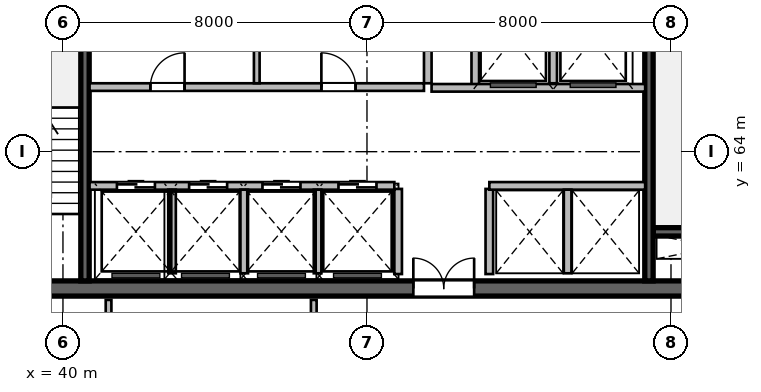
"""IFC4 building model, lengths in metres.
Left out: names, types, materials, properties, quantities, classifications, styles, units other than length and angle.
Written with IfcOpenShell. Run it as: python <this file> out.ifc"""

import sys

from ifc_helpers import new_model, si_unit, direction, frame, frame_2d, origin, place, context, subcontext, project, spatial, rectangle, extrude, source, transform, mapped, element, fill, save


model = new_model("IFC4")
c1 = context("Model", 3, precision=1e-05, world=origin(), true_north=direction((0.0, 1.0)))
c2 = subcontext(c1, "Body", "Model", "MODEL_VIEW")
j1 = project(units=[si_unit("LENGTHUNIT", "METRE"), si_unit("PLANEANGLEUNIT", "RADIAN")], contexts=[c1])
p1 = place(None, origin())
s1 = spatial("IfcSite", under=j1, at=p1, CompositionType="ELEMENT")
p2 = place(p1, origin())
s2 = spatial("IfcBuilding", under=s1, at=p2, CompositionType="ELEMENT")
p3 = place(p2, frame((0.0, 0.0, 283.5)))
s3 = spatial("IfcBuildingStorey", under=s2, at=p3, CompositionType="ELEMENT", Elevation=283.5)
m1 = source(origin(), c2, "Body", "SweptSolid", [
    extrude(rectangle(XDim=21.6, YDim=0.4, at=frame_2d((10.8, 0.0))), origin(), (0.0, 0.0, 1.0), 3.9),
])
p4 = place(p3, frame((37.2, 60.4, 0.0), z_axis=(0.0, 0.0, 1.0), x_axis=(1.0, 0.0, 0.0)))
e1 = element("IfcWall", 1, at=p4, inside=s3, PredefinedType="SHEAR", context=c2, shape_type="MappedRepresentation", body=[
    mapped(m1, transform((0.0, 0.0, 0.0), scale=1.0)),
])
p5 = place(p4, frame((1.1, 0.0, 0.0)))
e2 = element("IfcOpeningElement", 2, at=p5, cuts=e1, PredefinedType="OPENING", context=c2, shape_type="SweptSolid", body=[
    extrude(rectangle(XDim=1.15, YDim=2.15, at=frame_2d((0.575, 1.075))), frame((0.0, 0.21, 0.0), z_axis=(0.0, -1.0, 0.0), x_axis=(1.0, 0.0, 0.0)), (0.0, 0.0, 1.0), 0.42),
])
p6 = place(p4, frame((19.5, 0.0, 0.0)))
e3 = element("IfcOpeningElement", 3, at=p6, cuts=e1, PredefinedType="OPENING", context=c2, shape_type="SweptSolid", body=[
    extrude(rectangle(XDim=0.9, YDim=2.1, at=frame_2d((0.45, 1.05))), frame((0.0, 0.21, 0.0), z_axis=(0.0, -1.0, 0.0), x_axis=(1.0, 0.0, 0.0)), (0.0, 0.0, 1.0), 0.42),
])
p7 = place(p4, frame((12.02, 0.0, 0.0)))
e4 = element("IfcOpeningElement", 4, at=p7, cuts=e1, PredefinedType="OPENING", context=c2, shape_type="SweptSolid", body=[
    extrude(rectangle(XDim=1.6, YDim=2.15, at=frame_2d((0.8, 1.075))), frame((0.0, 0.21, 0.0), z_axis=(0.0, -1.0, 0.0), x_axis=(1.0, 0.0, 0.0)), (0.0, 0.0, 1.0), 0.42),
])
m2 = source(origin(), c2, "Body", "SweptSolid", [
    extrude(rectangle(XDim=3.27, YDim=0.22, at=frame_2d((1.635, 0.0))), origin(), (0.0, 0.0, 1.0), 3.9),
])
p8 = place(p3, frame((55.53, 61.89, 0.0), z_axis=(0.0, 0.0, 1.0), x_axis=(1.0, 0.0, 0.0)))
e5 = element("IfcWall", 5, at=p8, inside=s3, PredefinedType="SHEAR", context=c2, shape_type="MappedRepresentation", body=[
    mapped(m2, transform((0.0, 0.0, 0.0), scale=1.0)),
])
m3 = source(origin(), c2, "Body", "SweptSolid", [
    extrude(rectangle(XDim=11.2, YDim=0.22, at=frame_2d((5.6, 0.0))), origin(), (0.0, 0.0, 1.0), 3.9),
])
p9 = place(p3, frame((40.58, 60.6, 0.0), z_axis=(0.0, 0.0, 1.0), x_axis=(0.0, 1.0, 0.0)))
e6 = element("IfcWall", 6, at=p9, inside=s3, PredefinedType="SHEAR", context=c2, shape_type="MappedRepresentation", body=[
    mapped(m3, transform((0.0, 0.0, 0.0), scale=1.0)),
])
p10 = place(p3, frame((55.42, 60.6, 0.0), z_axis=(0.0, 0.0, 1.0), x_axis=(0.0, 1.0, 0.0)))
e7 = element("IfcWall", 7, at=p10, inside=s3, PredefinedType="SHEAR", context=c2, shape_type="MappedRepresentation", body=[
    mapped(m3, transform((0.0, 0.0, 0.0), scale=1.0)),
])
p11 = place(p10, frame((9.645, 0.0, 0.0)))
e8 = element("IfcOpeningElement", 8, at=p11, cuts=e7, PredefinedType="OPENING", context=c2, shape_type="SweptSolid", body=[
    extrude(rectangle(XDim=1.15, YDim=2.15, at=frame_2d((0.575, 1.075))), frame((0.0, 0.12, 0.0), z_axis=(0.0, -1.0, 0.0), x_axis=(1.0, 0.0, 0.0)), (0.0, 0.0, 1.0), 0.24),
])
m4 = source(origin(), c2, "Body", "SweptSolid", [
    extrude(rectangle(XDim=2.24, YDim=0.2, at=frame_2d((1.12, 0.0))), origin(), (0.0, 0.0, 1.0), 3.64),
])
for number, where, z_axis, x_axis in (
    (9, (48.82, 60.78, 0.0), (0.0, 0.0, 1.0), (0.0, 1.0, 0.0)),
    (10, (51.22, 60.78, 0.0), (0.0, 0.0, 1.0), (0.0, 1.0, 0.0)),
):
    element("IfcWall", number, at=place(p3, frame(where, z_axis=z_axis, x_axis=x_axis)), inside=s3, PredefinedType="SOLIDWALL", context=c2, shape_type="MappedRepresentation", body=[
        mapped(m4, transform((0.0, 0.0, 0.0), scale=1.0)),
    ])
m5 = source(origin(), c2, "Body", "SweptSolid", [
    extrude(rectangle(XDim=5.8, YDim=0.2, at=frame_2d((2.9, 0.0))), origin(), (0.0, 0.0, 1.0), 3.64),
])
p12 = place(p3, frame((49.6, 65.8, 0.0), z_axis=(0.0, 0.0, 1.0), x_axis=(0.0, 1.0, 0.0)))
e11 = element("IfcWall", 11, at=p12, inside=s3, PredefinedType="SOLIDWALL", context=c2, shape_type="MappedRepresentation", body=[
    mapped(m5, transform((0.0, 0.0, 0.0), scale=1.0)),
])
m6 = source(origin(), c2, "Body", "SweptSolid", [
    extrude(rectangle(XDim=2.58, YDim=0.2, at=frame_2d((1.29, 0.0))), origin(), (0.0, 0.0, 1.0), 3.64),
])
p13 = place(p3, frame((50.85, 65.68, 0.0), z_axis=(0.0, 0.0, 1.0), x_axis=(0.0, 1.0, 0.0)))
e12 = element("IfcWall", 12, at=p13, inside=s3, PredefinedType="SOLIDWALL", context=c2, shape_type="MappedRepresentation", body=[
    mapped(m6, transform((0.0, 0.0, 0.0), scale=1.0)),
])
m7 = source(origin(), c2, "Body", "SweptSolid", [
    extrude(rectangle(XDim=2.4, YDim=0.2, at=frame_2d((1.2, 0.0))), origin(), (0.0, 0.0, 1.0), 3.64),
])
p14 = place(p3, frame((52.9, 65.8, 0.0), z_axis=(0.0, 0.0, 1.0), x_axis=(0.0, 1.0, 0.0)))
e13 = element("IfcWall", 13, at=p14, inside=s3, PredefinedType="SOLIDWALL", context=c2, shape_type="MappedRepresentation", body=[
    mapped(m7, transform((0.0, 0.0, 0.0), scale=1.0)),
])
m8 = source(origin(), c2, "Body", "SweptSolid", [
    extrude(rectangle(XDim=5.62, YDim=0.2, at=frame_2d((2.81, 0.0))), origin(), (0.0, 0.0, 1.0), 3.64),
])
p15 = place(p3, frame((49.7, 65.68, 0.0), z_axis=(0.0, 0.0, 1.0), x_axis=(1.0, 0.0, 0.0)))
e14 = element("IfcWall", 14, at=p15, inside=s3, PredefinedType="SOLIDWALL", context=c2, shape_type="MappedRepresentation", body=[
    mapped(m8, transform((0.0, 0.0, 0.0), scale=1.0)),
])
m9 = source(origin(), c2, "Body", "SweptSolid", [
    extrude(rectangle(XDim=8.02, YDim=0.2, at=frame_2d((4.01, 0.0))), origin(), (0.0, 0.0, 1.0), 3.64),
])
p16 = place(p3, frame((40.7, 63.1, 0.0), z_axis=(0.0, 0.0, 1.0), x_axis=(1.0, 0.0, 0.0)))
e15 = element("IfcWall", 15, at=p16, inside=s3, PredefinedType="SOLIDWALL", context=c2, shape_type="MappedRepresentation", body=[
    mapped(m9, transform((0.0, 0.0, 0.0), scale=1.0)),
])
p17 = place(p16, frame((0.72, 0.0, 0.0)))
e16 = element("IfcOpeningElement", 16, at=p17, cuts=e15, PredefinedType="OPENING", context=c2, shape_type="SweptSolid", body=[
    extrude(rectangle(XDim=1.0, YDim=2.15, at=frame_2d((0.5, 1.075))), frame((0.0, 0.11, 0.0), z_axis=(0.0, -1.0, 0.0), x_axis=(1.0, 0.0, 0.0)), (0.0, 0.0, 1.0), 0.22),
])
p18 = place(p16, frame((2.62, 0.0, 0.0)))
e17 = element("IfcOpeningElement", 17, at=p18, cuts=e15, PredefinedType="OPENING", context=c2, shape_type="SweptSolid", body=[
    extrude(rectangle(XDim=1.0, YDim=2.15, at=frame_2d((0.5, 1.075))), frame((0.0, 0.11, 0.0), z_axis=(0.0, -1.0, 0.0), x_axis=(1.0, 0.0, 0.0)), (0.0, 0.0, 1.0), 0.22),
])
p19 = place(p16, frame((4.55, 0.0, 0.0)))
e18 = element("IfcOpeningElement", 18, at=p19, cuts=e15, PredefinedType="OPENING", context=c2, shape_type="SweptSolid", body=[
    extrude(rectangle(XDim=1.0, YDim=2.15, at=frame_2d((0.5, 1.075))), frame((0.0, 0.11, 0.0), z_axis=(0.0, -1.0, 0.0), x_axis=(1.0, 0.0, 0.0)), (0.0, 0.0, 1.0), 0.22),
])
p20 = place(p16, frame((6.55, 0.0, 0.0)))
e19 = element("IfcOpeningElement", 19, at=p20, cuts=e15, PredefinedType="OPENING", context=c2, shape_type="SweptSolid", body=[
    extrude(rectangle(XDim=1.0, YDim=2.15, at=frame_2d((0.5, 1.075))), frame((0.0, 0.11, 0.0), z_axis=(0.0, -1.0, 0.0), x_axis=(1.0, 0.0, 0.0)), (0.0, 0.0, 1.0), 0.22),
])
m10 = source(origin(), c2, "Body", "SweptSolid", [
    extrude(rectangle(XDim=4.1, YDim=0.2, at=frame_2d((2.05, 0.0))), origin(), (0.0, 0.0, 1.0), 3.64),
])
p21 = place(p3, frame((51.22, 63.1, 0.0), z_axis=(0.0, 0.0, 1.0), x_axis=(1.0, 0.0, 0.0)))
e20 = element("IfcWall", 20, at=p21, inside=s3, PredefinedType="SOLIDWALL", context=c2, shape_type="MappedRepresentation", body=[
    mapped(m10, transform((0.0, 0.0, 0.0), scale=1.0)),
])
m11 = source(origin(), c2, "Body", "SweptSolid", [
    extrude(rectangle(XDim=2.2, YDim=0.2, at=frame_2d((1.1, 0.0))), origin(), (0.0, 0.0, 1.0), 3.64),
])
for number, where, z_axis, x_axis in (
    (21, (42.87, 60.8, 0.0), (0.0, 0.0, 1.0), (0.0, 1.0, 0.0)),
    (22, (44.77, 60.8, 0.0), (0.0, 0.0, 1.0), (0.0, 1.0, 0.0)),
    (23, (46.7, 60.8, 0.0), (0.0, 0.0, 1.0), (0.0, 1.0, 0.0)),
    (24, (53.28, 60.8, 0.0), (0.0, 0.0, 1.0), (0.0, 1.0, 0.0)),
):
    element("IfcWall", number, at=place(p3, frame(where, z_axis=z_axis, x_axis=x_axis)), inside=s3, PredefinedType="SOLIDWALL", context=c2, shape_type="MappedRepresentation", body=[
        mapped(m11, transform((0.0, 0.0, 0.0), scale=1.0)),
    ])
m12 = source(origin(), c2, "Body", "SweptSolid", [
    extrude(rectangle(XDim=8.8, YDim=0.2, at=frame_2d((4.4, 0.0))), origin(), (0.0, 0.0, 1.0), 3.64),
])
p22 = place(p3, frame((40.7, 65.7, 0.0), z_axis=(0.0, 0.0, 1.0), x_axis=(1.0, 0.0, 0.0)))
e25 = element("IfcWall", 25, at=p22, inside=s3, PredefinedType="SOLIDWALL", context=c2, shape_type="MappedRepresentation", body=[
    mapped(m12, transform((0.0, 0.0, 0.0), scale=1.0)),
])
p23 = place(p22, frame((1.6, 0.0, 0.0)))
e26 = element("IfcOpeningElement", 26, at=p23, cuts=e25, PredefinedType="OPENING", context=c2, shape_type="SweptSolid", body=[
    extrude(rectangle(XDim=0.9, YDim=2.1, at=frame_2d((0.45, 1.05))), frame((0.0, 0.11, 0.0), z_axis=(0.0, -1.0, 0.0), x_axis=(1.0, 0.0, 0.0)), (0.0, 0.0, 1.0), 0.22),
])
p24 = place(p22, frame((6.1, 0.0, 0.0)))
e27 = element("IfcOpeningElement", 27, at=p24, cuts=e25, PredefinedType="OPENING", context=c2, shape_type="SweptSolid", body=[
    extrude(rectangle(XDim=0.9, YDim=2.1, at=frame_2d((0.45, 1.05))), frame((0.0, 0.11, 0.0), z_axis=(0.0, -1.0, 0.0), x_axis=(1.0, 0.0, 0.0)), (0.0, 0.0, 1.0), 0.22),
])
m13 = source(origin(), c2, "Body", "SweptSolid", [
    extrude(rectangle(XDim=2.4, YDim=0.15, at=frame_2d((1.2, 0.0))), origin(), (0.0, 0.0, 1.0), 3.64),
])
p25 = place(p3, frame((45.1, 65.8, 0.0), z_axis=(0.0, 0.0, 1.0), x_axis=(0.0, 1.0, 0.0)))
e28 = element("IfcWall", 28, at=p25, inside=s3, PredefinedType="PARTITIONING", context=c2, shape_type="MappedRepresentation", body=[
    mapped(m13, transform((0.0, 0.0, 0.0), scale=1.0)),
])
m14 = source(origin(), c2, "Body", "SweptSolid", [
    extrude(rectangle(XDim=2.033, YDim=0.15, at=frame_2d((1.016, 0.0))), origin(), (0.0, 0.0, 1.0), 3.64),
])
p26 = place(p3, frame((41.2, 58.067, 0.0), z_axis=(0.0, 0.0, 1.0), x_axis=(0.0, 1.0, 0.0)))
e29 = element("IfcWall", 29, at=p26, inside=s3, PredefinedType="PARTITIONING", context=c2, shape_type="MappedRepresentation", body=[
    mapped(m14, transform((0.0, 0.0, 0.0), scale=1.0)),
])
p27 = place(p26, frame((0.591, 0.0, 0.0)))
e30 = element("IfcOpeningElement", 30, at=p27, cuts=e29, PredefinedType="OPENING", context=c2, shape_type="SweptSolid", body=[
    extrude(rectangle(XDim=0.85, YDim=2.1, at=frame_2d((0.425, 1.05))), frame((0.0, 0.085, 0.0), z_axis=(0.0, -1.0, 0.0), x_axis=(1.0, 0.0, 0.0)), (0.0, 0.0, 1.0), 0.17),
])
p28 = place(p3, frame((46.6, 58.067, 0.0), z_axis=(0.0, 0.0, 1.0), x_axis=(0.0, 1.0, 0.0)))
e31 = element("IfcWall", 31, at=p28, inside=s3, PredefinedType="PARTITIONING", context=c2, shape_type="MappedRepresentation", body=[
    mapped(m14, transform((0.0, 0.0, 0.0), scale=1.0)),
])
m15 = source(origin(), c2, "Body", "SweptSolid", [
    extrude(rectangle(XDim=1.6, YDim=2.15, at=frame_2d((0.8, 1.075))), frame((0.0, 0.025, 0.0), z_axis=(0.0, -1.0, 0.0), x_axis=(1.0, 0.0, 0.0)), (0.0, 0.0, 1.0), 0.05),
])
p29 = place(p7, origin())
e32 = element("IfcDoor", 32, at=p29, inside=s3, OperationType="DOUBLE_DOOR_SINGLE_SWING", PredefinedType="DOOR", context=c2, shape_type="MappedRepresentation", body=[
    mapped(m15, transform((0.0, 0.0, 0.0), scale=1.0)),
])
fill(e4, e32)
m16 = source(origin(), c2, "Body", "SweptSolid", [
    extrude(rectangle(XDim=1.0, YDim=2.15, at=frame_2d((0.5, 1.075))), frame((0.0, 0.025, 0.0), z_axis=(0.0, -1.0, 0.0), x_axis=(1.0, 0.0, 0.0)), (0.0, 0.0, 1.0), 0.05),
])
p30 = place(p17, origin())
e33 = element("IfcDoor", 33, at=p30, inside=s3, OperationType="DOUBLE_DOOR_SLIDING", PredefinedType="DOOR", context=c2, shape_type="MappedRepresentation", body=[
    mapped(m16, transform((0.0, 0.0, 0.0), scale=1.0)),
])
fill(e16, e33)
p31 = place(p18, origin())
e34 = element("IfcDoor", 34, at=p31, inside=s3, OperationType="DOUBLE_DOOR_SLIDING", PredefinedType="DOOR", context=c2, shape_type="MappedRepresentation", body=[
    mapped(m16, transform((0.0, 0.0, 0.0), scale=1.0)),
])
fill(e17, e34)
p32 = place(p19, origin())
e35 = element("IfcDoor", 35, at=p32, inside=s3, OperationType="DOUBLE_DOOR_SLIDING", PredefinedType="DOOR", context=c2, shape_type="MappedRepresentation", body=[
    mapped(m16, transform((0.0, 0.0, 0.0), scale=1.0)),
])
fill(e18, e35)
p33 = place(p20, origin())
e36 = element("IfcDoor", 36, at=p33, inside=s3, OperationType="DOUBLE_DOOR_SLIDING", PredefinedType="DOOR", context=c2, shape_type="MappedRepresentation", body=[
    mapped(m16, transform((0.0, 0.0, 0.0), scale=1.0)),
])
fill(e19, e36)
m17 = source(origin(), c2, "Body", "SweptSolid", [
    extrude(rectangle(XDim=0.9, YDim=2.1, at=frame_2d((0.45, 1.05))), frame((0.0, 0.025, 0.0), z_axis=(0.0, -1.0, 0.0), x_axis=(1.0, 0.0, 0.0)), (0.0, 0.0, 1.0), 0.05),
])
p34 = place(p23, origin())
e37 = element("IfcDoor", 37, at=p34, inside=s3, OperationType="SINGLE_SWING_RIGHT", PredefinedType="DOOR", context=c2, shape_type="MappedRepresentation", body=[
    mapped(m17, transform((0.0, 0.0, 0.0), scale=1.0)),
])
fill(e26, e37)
p35 = place(p24, origin())
e38 = element("IfcDoor", 38, at=p35, inside=s3, OperationType="SINGLE_SWING_LEFT", PredefinedType="DOOR", context=c2, shape_type="MappedRepresentation", body=[
    mapped(m17, transform((0.0, 0.0, 0.0), scale=1.0)),
])
fill(e27, e38)
save(model, sys.argv[1])
